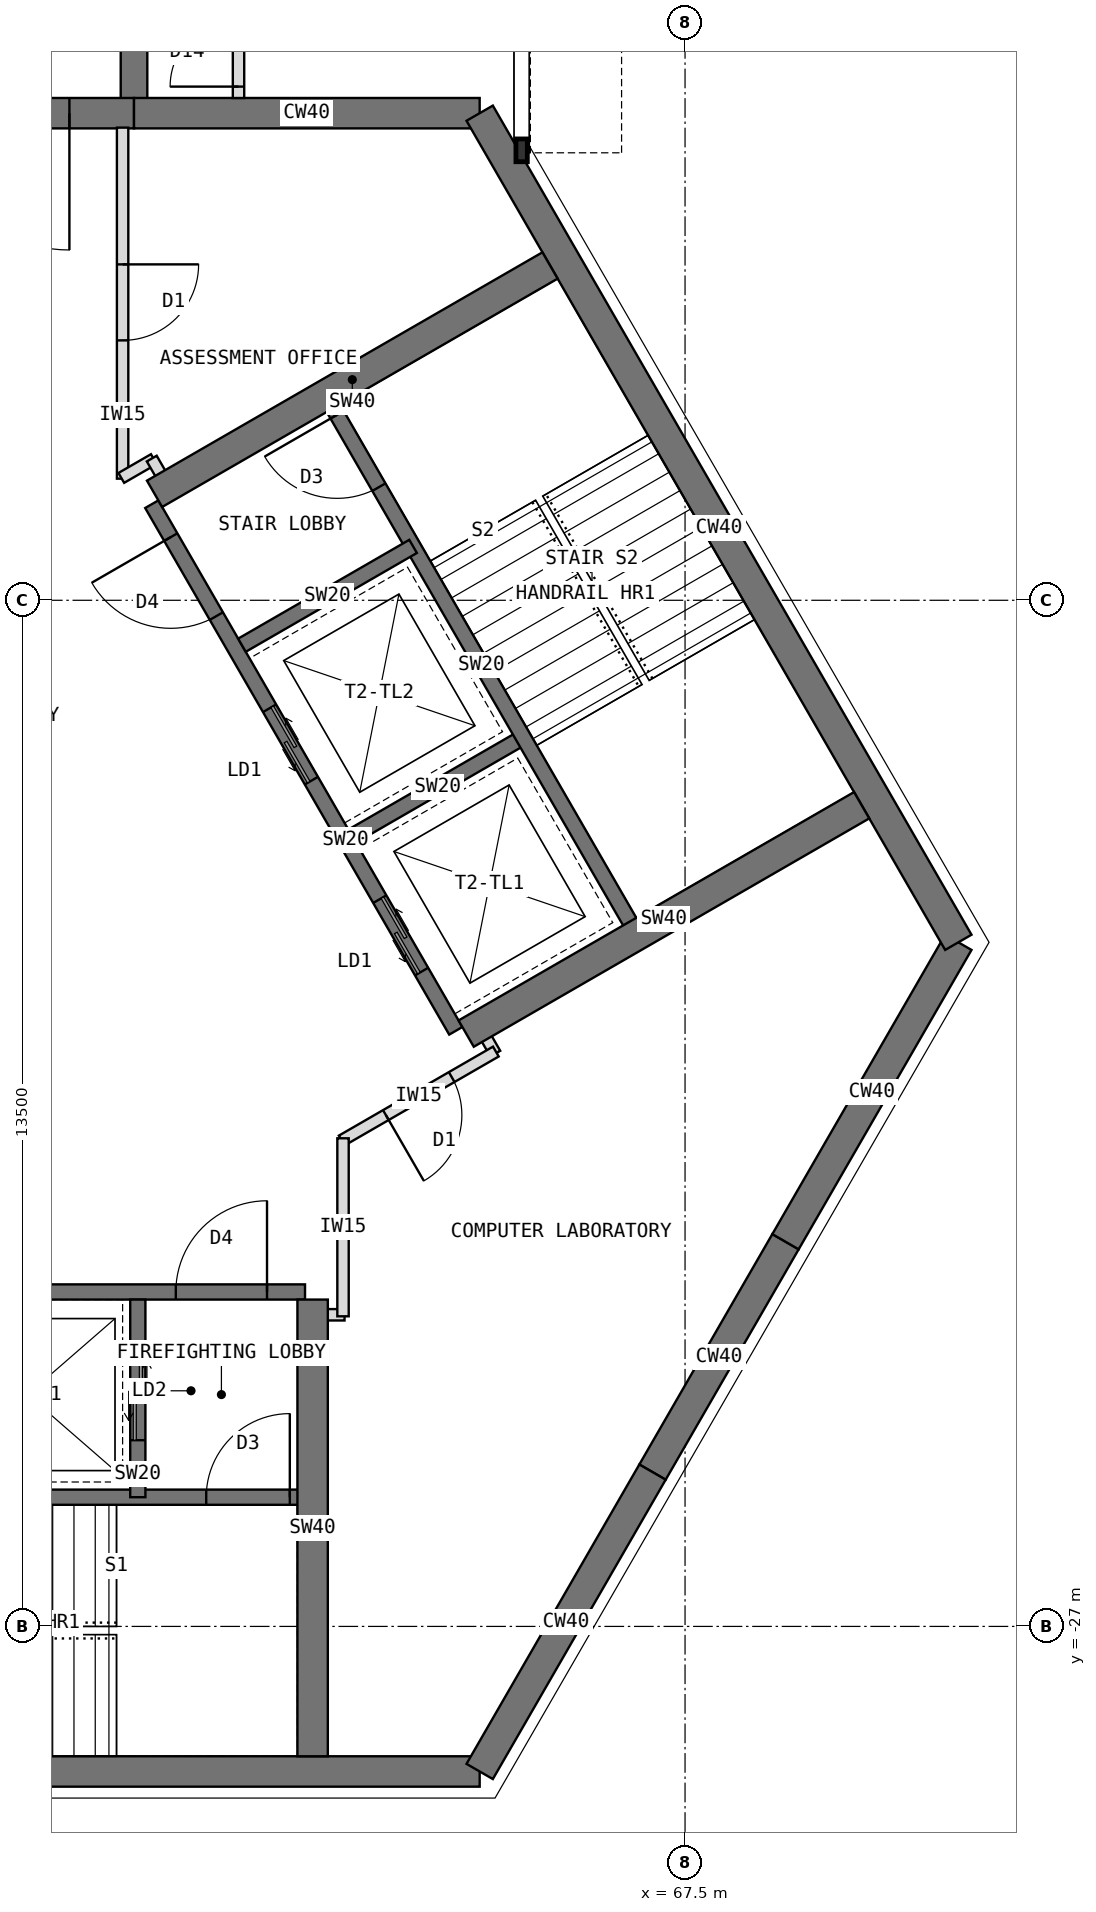
"""IFC4 building model, lengths in metres.
Left out: names, types, materials, properties, quantities, classifications, styles, units other than length and angle.
Written with IfcOpenShell. Run it as: python <this file> out.ifc"""

import sys

from ifc_helpers import new_model, si_unit, direction, frame, frame_2d, origin, place, context, subcontext, project, spatial, rectangle, extrude, element, fill, save


model = new_model("IFC4")
c1 = context("Model", 3, precision=1e-05, world=origin(), true_north=direction((0.0, 1.0)))
c2 = subcontext(c1, "Body", "Model", "MODEL_VIEW")
j1 = project(units=[si_unit("LENGTHUNIT", "METRE"), si_unit("PLANEANGLEUNIT", "RADIAN")], contexts=[c1])
p1 = place(None, origin())
s1 = spatial("IfcSite", under=j1, at=p1, CompositionType="ELEMENT")
p2 = place(p1, origin())
s2 = spatial("IfcBuilding", under=s1, at=p2, CompositionType="ELEMENT")
p3 = place(p2, frame((0.0, 0.0, 251.5)))
s3 = spatial("IfcBuildingStorey", under=s2, at=p3, CompositionType="ELEMENT", Elevation=251.5)
p4 = place(p3, frame((64.798, -7.092, 0.0), z_axis=(0.0, 0.0, 1.0), x_axis=(-1.0, 0.0, 0.0)))
e1 = element("IfcWall", 1, at=p4, inside=s3, PredefinedType="SHEAR", context=c2, shape_type="SweptSolid", body=[
    extrude(rectangle(XDim=4.548, YDim=0.4, at=frame_2d((2.274, 0.0))), origin(), (0.0, 0.0, 1.0), 4.0),
])
p5 = place(p3, frame((60.25, -7.092, 0.0), z_axis=(0.0, 0.0, 1.0), x_axis=(-1.0, 0.0, 0.0)))
e2 = element("IfcWall", 2, at=p5, inside=s3, PredefinedType="SHEAR", context=c2, shape_type="SweptSolid", body=[
    extrude(rectangle(XDim=3.5, YDim=0.4, at=frame_2d((1.75, 0.0))), origin(), (0.0, 0.0, 1.0), 4.0),
])
p6 = place(p5, frame((0.85, 0.0, 0.0)))
e3 = element("IfcOpeningElement", 3, at=p6, cuts=e2, PredefinedType="OPENING", context=c2, shape_type="SweptSolid", body=[
    extrude(rectangle(XDim=1.8, YDim=2.1, at=frame_2d((0.9, 1.05))), frame((0.0, 0.21, 0.0), z_axis=(0.0, -1.0, 0.0), x_axis=(1.0, 0.0, 0.0)), (0.0, 0.0, 1.0), 0.42),
])
p7 = place(p3, frame((52.202, -28.908, 0.0), z_axis=(0.0, 0.0, 1.0), x_axis=(1.0, 0.0, 0.0)))
e4 = element("IfcWall", 4, at=p7, inside=s3, PredefinedType="SHEAR", context=c2, shape_type="SweptSolid", body=[
    extrude(rectangle(XDim=12.596, YDim=0.4, at=frame_2d((6.298, 0.0))), origin(), (0.0, 0.0, 1.0), 4.0),
])
p8 = place(p3, frame((64.798, -28.908, 0.0), z_axis=(0.0, 0.0, 1.0), x_axis=(0.499984222037, 0.866034513004, 0.0)))
e5 = element("IfcWall", 5, at=p8, inside=s3, PredefinedType="SHEAR", context=c2, shape_type="SweptSolid", body=[
    extrude(rectangle(XDim=4.548, YDim=0.4, at=frame_2d((2.274, 0.0))), origin(), (0.0, 0.0, 1.0), 4.0),
])
p9 = place(p3, frame((67.072, -24.97, 0.0), z_axis=(0.0, 0.0, 1.0), x_axis=(0.500010275428, 0.866019471182, 0.0)))
e6 = element("IfcWall", 6, at=p9, inside=s3, PredefinedType="SHEAR", context=c2, shape_type="SweptSolid", body=[
    extrude(rectangle(XDim=3.5, YDim=0.4, at=frame_2d((1.75, 0.0))), origin(), (0.0, 0.0, 1.0), 4.0),
])
p10 = place(p3, frame((68.822, -21.939, 0.0), z_axis=(0.0, 0.0, 1.0), x_axis=(0.500024481964, 0.866011268655, 0.0)))
e7 = element("IfcWall", 7, at=p10, inside=s3, PredefinedType="SHEAR", context=c2, shape_type="SweptSolid", body=[
    extrude(rectangle(XDim=4.548, YDim=0.4, at=frame_2d((2.274, 0.0))), origin(), (0.0, 0.0, 1.0), 4.0),
])
p11 = place(p3, frame((71.096, -18.0, 0.0), z_axis=(0.0, 0.0, 1.0), x_axis=(-0.500005998175, 0.866021940709, 0.0)))
e8 = element("IfcWall", 8, at=p11, inside=s3, PredefinedType="SHEAR", context=c2, shape_type="SweptSolid", body=[
    extrude(rectangle(XDim=12.596, YDim=0.4, at=frame_2d((6.298, 0.0))), origin(), (0.0, 0.0, 1.0), 4.0),
])
p12 = place(p3, frame((60.25, -7.092, 0.0), z_axis=(0.0, 0.0, 1.0), x_axis=(0.0, 1.0, 0.0)))
e9 = element("IfcWall", 9, at=p12, inside=s3, PredefinedType="SHEAR", context=c2, shape_type="SweptSolid", body=[
    extrude(rectangle(XDim=2.592, YDim=0.35, at=frame_2d((1.296, 0.0))), origin(), (0.0, 0.0, 1.0), 4.0),
])
p13 = place(p3, frame((54.5, -22.6, 0.0), z_axis=(0.0, 0.0, 1.0), x_axis=(1.0, 0.0, 0.0)))
e10 = element("IfcWall", 10, at=p13, inside=s3, PredefinedType="SHEAR", context=c2, shape_type="SweptSolid", body=[
    extrude(rectangle(XDim=8.0, YDim=0.2, at=frame_2d((4.0, 0.0))), origin(), (0.0, 0.0, 1.0), 4.0),
])
p14 = place(p13, frame((6.3, 0.0, 0.0)))
e11 = element("IfcOpeningElement", 11, at=p14, cuts=e10, PredefinedType="OPENING", context=c2, shape_type="SweptSolid", body=[
    extrude(rectangle(XDim=1.2, YDim=2.1, at=frame_2d((0.6, 1.05))), frame((0.0, 0.11, 0.0), z_axis=(0.0, -1.0, 0.0), x_axis=(1.0, 0.0, 0.0)), (0.0, 0.0, 1.0), 0.22),
])
p15 = place(p13, frame((0.9, 0.0, 0.0)))
e12 = element("IfcOpeningElement", 12, at=p15, cuts=e10, PredefinedType="OPENING", context=c2, shape_type="SweptSolid", body=[
    extrude(rectangle(XDim=1.1, YDim=2.2, at=frame_2d((0.55, 1.1))), frame((0.0, 0.11, 0.0), z_axis=(0.0, -1.0, 0.0), x_axis=(1.0, 0.0, 0.0)), (0.0, 0.0, 1.0), 0.22),
])
p16 = place(p3, frame((60.3, -22.7, 0.0), z_axis=(0.0, 0.0, 1.0), x_axis=(0.0, -1.0, 0.0)))
e13 = element("IfcWall", 13, at=p16, inside=s3, PredefinedType="SHEAR", context=c2, shape_type="SweptSolid", body=[
    extrude(rectangle(XDim=2.6, YDim=0.2, at=frame_2d((1.3, 0.0))), origin(), (0.0, 0.0, 1.0), 4.0),
])
p17 = place(p16, frame((0.55, 0.0, 0.0)))
e14 = element("IfcOpeningElement", 14, at=p17, cuts=e13, PredefinedType="OPENING", context=c2, shape_type="SweptSolid", body=[
    extrude(rectangle(XDim=1.3, YDim=2.2, at=frame_2d((0.65, 1.1))), frame((0.0, 0.11, 0.0), z_axis=(0.0, -1.0, 0.0), x_axis=(1.0, 0.0, 0.0)), (0.0, 0.0, 1.0), 0.22),
])
p18 = place(p3, frame((54.5, -25.3, 0.0), z_axis=(0.0, 0.0, 1.0), x_axis=(1.0, 0.0, 0.0)))
e15 = element("IfcWall", 15, at=p18, inside=s3, PredefinedType="SHEAR", context=c2, shape_type="SweptSolid", body=[
    extrude(rectangle(XDim=8.0, YDim=0.2, at=frame_2d((4.0, 0.0))), origin(), (0.0, 0.0, 1.0), 4.0),
])
p19 = place(p18, frame((6.7, 0.0, 0.0)))
e16 = element("IfcOpeningElement", 16, at=p19, cuts=e15, PredefinedType="OPENING", context=c2, shape_type="SweptSolid", body=[
    extrude(rectangle(XDim=1.1, YDim=2.1, at=frame_2d((0.55, 1.05))), frame((0.0, 0.11, 0.0), z_axis=(0.0, -1.0, 0.0), x_axis=(1.0, 0.0, 0.0)), (0.0, 0.0, 1.0), 0.22),
])
p20 = place(p3, frame((62.6, -22.7, 0.0), z_axis=(0.0, 0.0, 1.0), x_axis=(0.0, -1.0, 0.0)))
e17 = element("IfcWall", 17, at=p20, inside=s3, PredefinedType="SHEAR", context=c2, shape_type="SweptSolid", body=[
    extrude(rectangle(XDim=6.008, YDim=0.4, at=frame_2d((3.004, 0.0))), origin(), (0.0, 0.0, 1.0), 4.0),
])
p21 = place(p3, frame((64.484, -19.164, 0.0), z_axis=(0.0, 0.0, 1.0), x_axis=(-0.49999894854, 0.866026010844, 0.0)))
e18 = element("IfcWall", 18, at=p21, inside=s3, PredefinedType="SHEAR", context=c2, shape_type="SweptSolid", body=[
    extrude(rectangle(XDim=8.0, YDim=0.2, at=frame_2d((4.0, 0.0))), origin(), (0.0, 0.0, 1.0), 4.0),
])
p22 = place(p21, frame((6.3, 0.0, 0.0)))
e19 = element("IfcOpeningElement", 19, at=p22, cuts=e18, PredefinedType="OPENING", context=c2, shape_type="SweptSolid", body=[
    extrude(rectangle(XDim=1.2, YDim=2.1, at=frame_2d((0.6, 1.05))), frame((0.0, 0.11, 0.0), z_axis=(0.0, -1.0, 0.0), x_axis=(1.0, 0.0, 0.0)), (0.0, 0.0, 1.0), 0.22),
])
p23 = place(p21, frame((0.9, 0.0, 0.0)))
e20 = element("IfcOpeningElement", 20, at=p23, cuts=e18, PredefinedType="OPENING", context=c2, shape_type="SweptSolid", body=[
    extrude(rectangle(XDim=1.1, YDim=2.2, at=frame_2d((0.55, 1.1))), frame((0.0, 0.11, 0.0), z_axis=(0.0, -1.0, 0.0), x_axis=(1.0, 0.0, 0.0)), (0.0, 0.0, 1.0), 0.22),
])
p24 = place(p21, frame((3.8, 0.0, 0.0)))
e21 = element("IfcOpeningElement", 21, at=p24, cuts=e18, PredefinedType="OPENING", context=c2, shape_type="SweptSolid", body=[
    extrude(rectangle(XDim=1.1, YDim=2.2, at=frame_2d((0.55, 1.1))), frame((0.0, 0.11, 0.0), z_axis=(0.0, -1.0, 0.0), x_axis=(1.0, 0.0, 0.0)), (0.0, 0.0, 1.0), 0.22),
])
p25 = place(p3, frame((63.12, -16.603, 0.0), z_axis=(0.0, 0.0, 1.0), x_axis=(0.866062058628, 0.499936506574, 0.0)))
e22 = element("IfcWall", 22, at=p25, inside=s3, PredefinedType="SHEAR", context=c2, shape_type="SweptSolid", body=[
    extrude(rectangle(XDim=2.6, YDim=0.2, at=frame_2d((1.3, 0.0))), origin(), (0.0, 0.0, 1.0), 4.0),
])
p26 = place(p3, frame((61.67, -14.091, 0.0), z_axis=(0.0, 0.0, 1.0), x_axis=(0.86603858612, 0.49997716683, 0.0)))
e23 = element("IfcWall", 23, at=p26, inside=s3, PredefinedType="SHEAR", context=c2, shape_type="SweptSolid", body=[
    extrude(rectangle(XDim=2.6, YDim=0.2, at=frame_2d((1.3, 0.0))), origin(), (0.0, 0.0, 1.0), 4.0),
])
p27 = place(p3, frame((66.822, -17.814, 0.0), z_axis=(0.0, 0.0, 1.0), x_axis=(-0.49999894854, 0.866026010844, 0.0)))
e24 = element("IfcWall", 24, at=p27, inside=s3, PredefinedType="SHEAR", context=c2, shape_type="SweptSolid", body=[
    extrude(rectangle(XDim=8.0, YDim=0.2, at=frame_2d((4.0, 0.0))), origin(), (0.0, 0.0, 1.0), 4.0),
])
p28 = place(p27, frame((6.7, 0.0, 0.0)))
e25 = element("IfcOpeningElement", 25, at=p28, cuts=e24, PredefinedType="OPENING", context=c2, shape_type="SweptSolid", body=[
    extrude(rectangle(XDim=1.1, YDim=2.1, at=frame_2d((0.55, 1.05))), frame((0.0, 0.11, 0.0), z_axis=(0.0, -1.0, 0.0), x_axis=(1.0, 0.0, 0.0)), (0.0, 0.0, 1.0), 0.22),
])
for number, where, z_axis, x_axis in (
    (26, (60.52, -12.099, 0.0), (0.0, 0.0, 1.0), (0.866, 0.5, 0.0)),
    (27, (64.62, -19.201, 0.0), (0.0, 0.0, 1.0), (0.866, 0.5, 0.0)),
):
    element("IfcWall", number, at=place(p3, frame(where, z_axis=z_axis, x_axis=x_axis)), inside=s3, PredefinedType="SHEAR", context=c2, shape_type="SweptSolid", body=[
        extrude(rectangle(XDim=6.008, YDim=0.4, at=frame_2d((3.004, 0.0))), origin(), (0.0, 0.0, 1.0), 4.0),
    ])
p29 = place(p3, frame((61.625, -6.892, 0.0), z_axis=(0.0, 0.0, 1.0), x_axis=(0.0, 1.0, 0.0)))
e28 = element("IfcWall", 28, at=p29, inside=s3, PredefinedType="PARTITIONING", context=c2, shape_type="SweptSolid", body=[
    extrude(rectangle(XDim=2.4, YDim=0.15, at=frame_2d((1.2, 0.0))), origin(), (0.0, 0.0, 1.0), 3.8),
])
p30 = place(p29, frame((0.15, 0.0, 0.0)))
e29 = element("IfcOpeningElement", 29, at=p30, cuts=e28, PredefinedType="OPENING", context=c2, shape_type="SweptSolid", body=[
    extrude(rectangle(XDim=0.9, YDim=2.1, at=frame_2d((0.45, 1.05))), frame((0.0, 0.085, 0.0), z_axis=(0.0, -1.0, 0.0), x_axis=(1.0, 0.0, 0.0)), (0.0, 0.0, 1.0), 0.17),
])
p31 = place(p3, frame((63.02, -22.9, 0.0), z_axis=(0.0, 0.0, 1.0), x_axis=(-1.0, 0.0, 0.0)))
e30 = element("IfcWall", 30, at=p31, inside=s3, PredefinedType="PARTITIONING", context=c2, shape_type="SweptSolid", body=[
    extrude(rectangle(XDim=0.43, YDim=0.15, at=frame_2d((0.215, 0.0))), origin(), (0.0, 0.0, 1.0), 3.8),
])
p32 = place(p3, frame((60.1, -7.282, 0.0), z_axis=(0.0, 0.0, 1.0), x_axis=(0.0, -1.0, 0.0)))
e31 = element("IfcWall", 31, at=p32, inside=s3, PredefinedType="PARTITIONING", context=c2, shape_type="SweptSolid", body=[
    extrude(rectangle(XDim=4.618, YDim=0.15, at=frame_2d((2.309, 0.0))), origin(), (0.0, 0.0, 1.0), 3.8),
])
p33 = place(p32, frame((1.799, 0.0, 0.0)))
e32 = element("IfcOpeningElement", 32, at=p33, cuts=e31, PredefinedType="OPENING", context=c2, shape_type="SweptSolid", body=[
    extrude(rectangle(XDim=1.0, YDim=2.1, at=frame_2d((0.5, 1.05))), frame((0.0, 0.085, 0.0), z_axis=(0.0, -1.0, 0.0), x_axis=(1.0, 0.0, 0.0)), (0.0, 0.0, 1.0), 0.17),
])
p34 = place(p3, frame((60.083, -11.89, 0.0), z_axis=(0.0, 0.0, 1.0), x_axis=(0.865831790172, 0.50033519877, 0.0)))
e33 = element("IfcWall", 33, at=p34, inside=s3, PredefinedType="PARTITIONING", context=c2, shape_type="SweptSolid", body=[
    extrude(rectangle(XDim=0.494, YDim=0.15, at=frame_2d((0.247, 0.0))), origin(), (0.0, 0.0, 1.0), 3.8),
])
for number, where, z_axis, x_axis in (
    (34, (60.483, -11.635, 0.0), (0.0, 0.0, 1.0), (0.5, -0.866, 0.0)),
    (35, (64.789, -19.092, 0.0), (0.0, 0.0, 1.0), (0.5, -0.866, 0.0)),
):
    element("IfcWall", number, at=place(p3, frame(where, z_axis=z_axis, x_axis=x_axis)), inside=s3, PredefinedType="PARTITIONING", context=c2, shape_type="SweptSolid", body=[
        extrude(rectangle(XDim=0.43, YDim=0.15, at=frame_2d((0.215, 0.0))), origin(), (0.0, 0.0, 1.0), 3.8),
    ])
p35 = place(p3, frame((65.011, -19.437, 0.0), z_axis=(0.0, 0.0, 1.0), x_axis=(-0.865982457891, -0.500074377092, 0.0)))
e36 = element("IfcWall", 36, at=p35, inside=s3, PredefinedType="PARTITIONING", context=c2, shape_type="SweptSolid", body=[
    extrude(rectangle(XDim=2.342, YDim=0.15, at=frame_2d((1.171, 0.0))), origin(), (0.0, 0.0, 1.0), 3.8),
])
p36 = place(p35, frame((0.671, 0.0, 0.0)))
e37 = element("IfcOpeningElement", 37, at=p36, cuts=e36, PredefinedType="OPENING", context=c2, shape_type="SweptSolid", body=[
    extrude(rectangle(XDim=1.0, YDim=2.1, at=frame_2d((0.5, 1.05))), frame((0.0, 0.085, 0.0), z_axis=(0.0, -1.0, 0.0), x_axis=(1.0, 0.0, 0.0)), (0.0, 0.0, 1.0), 0.17),
])
p37 = place(p3, frame((63.0, -20.578, 0.0), z_axis=(0.0, 0.0, 1.0), x_axis=(0.0, -1.0, 0.0)))
e38 = element("IfcWall", 38, at=p37, inside=s3, PredefinedType="PARTITIONING", context=c2, shape_type="SweptSolid", body=[
    extrude(rectangle(XDim=2.342, YDim=0.15, at=frame_2d((1.171, 0.0))), origin(), (0.0, 0.0, 1.0), 3.8),
])
p38 = place(p14, origin())
e39 = element("IfcDoor", 39, at=p38, inside=s3, OperationType="SINGLE_SWING_RIGHT", PredefinedType="DOOR", context=c2, shape_type="SweptSolid", body=[
    extrude(rectangle(XDim=1.2, YDim=2.1, at=frame_2d((0.6, 1.05))), frame((0.0, 0.025, 0.0), z_axis=(0.0, -1.0, 0.0), x_axis=(1.0, 0.0, 0.0)), (0.0, 0.0, 1.0), 0.05),
])
fill(e11, e39)
p39 = place(p17, origin())
e40 = element("IfcDoor", 40, at=p39, inside=s3, OperationType="DOUBLE_DOOR_SLIDING", PredefinedType="DOOR", context=c2, shape_type="SweptSolid", body=[
    extrude(rectangle(XDim=1.3, YDim=2.2, at=frame_2d((0.65, 1.1))), frame((0.0, 0.025, 0.0), z_axis=(0.0, -1.0, 0.0), x_axis=(1.0, 0.0, 0.0)), (0.0, 0.0, 1.0), 0.05),
])
fill(e14, e40)
p40 = place(p19, origin())
e41 = element("IfcDoor", 41, at=p40, inside=s3, OperationType="SINGLE_SWING_RIGHT", PredefinedType="DOOR", context=c2, shape_type="SweptSolid", body=[
    extrude(rectangle(XDim=1.1, YDim=2.1, at=frame_2d((0.55, 1.05))), frame((0.0, 0.025, 0.0), z_axis=(0.0, -1.0, 0.0), x_axis=(1.0, 0.0, 0.0)), (0.0, 0.0, 1.0), 0.05),
])
fill(e16, e41)
p41 = place(p22, origin())
e42 = element("IfcDoor", 42, at=p41, inside=s3, OperationType="SINGLE_SWING_RIGHT", PredefinedType="DOOR", context=c2, shape_type="SweptSolid", body=[
    extrude(rectangle(XDim=1.2, YDim=2.1, at=frame_2d((0.6, 1.05))), frame((0.0, 0.025, 0.0), z_axis=(0.0, -1.0, 0.0), x_axis=(1.0, 0.0, 0.0)), (0.0, 0.0, 1.0), 0.05),
])
fill(e19, e42)
p42 = place(p23, origin())
e43 = element("IfcDoor", 43, at=p42, inside=s3, OperationType="DOUBLE_DOOR_SLIDING", PredefinedType="DOOR", context=c2, shape_type="SweptSolid", body=[
    extrude(rectangle(XDim=1.1, YDim=2.2, at=frame_2d((0.55, 1.1))), frame((0.0, 0.025, 0.0), z_axis=(0.0, -1.0, 0.0), x_axis=(1.0, 0.0, 0.0)), (0.0, 0.0, 1.0), 0.05),
])
fill(e20, e43)
p43 = place(p24, origin())
e44 = element("IfcDoor", 44, at=p43, inside=s3, OperationType="DOUBLE_DOOR_SLIDING", PredefinedType="DOOR", context=c2, shape_type="SweptSolid", body=[
    extrude(rectangle(XDim=1.1, YDim=2.2, at=frame_2d((0.55, 1.1))), frame((0.0, 0.025, 0.0), z_axis=(0.0, -1.0, 0.0), x_axis=(1.0, 0.0, 0.0)), (0.0, 0.0, 1.0), 0.05),
])
fill(e21, e44)
p44 = place(p28, origin())
e45 = element("IfcDoor", 45, at=p44, inside=s3, OperationType="SINGLE_SWING_RIGHT", PredefinedType="DOOR", context=c2, shape_type="SweptSolid", body=[
    extrude(rectangle(XDim=1.1, YDim=2.1, at=frame_2d((0.55, 1.05))), frame((0.0, 0.025, 0.0), z_axis=(0.0, -1.0, 0.0), x_axis=(1.0, 0.0, 0.0)), (0.0, 0.0, 1.0), 0.05),
])
fill(e25, e45)
p45 = place(p6, origin())
e46 = element("IfcDoor", 46, at=p45, inside=s3, OperationType="DOUBLE_DOOR_DOUBLE_SWING", PredefinedType="DOOR", context=c2, shape_type="SweptSolid", body=[
    extrude(rectangle(XDim=1.8, YDim=2.1, at=frame_2d((0.9, 1.05))), frame((0.0, 0.025, 0.0), z_axis=(0.0, -1.0, 0.0), x_axis=(1.0, 0.0, 0.0)), (0.0, 0.0, 1.0), 0.05),
])
fill(e3, e46)
p46 = place(p30, origin())
e47 = element("IfcDoor", 47, at=p46, inside=s3, OperationType="SINGLE_SWING_LEFT", PredefinedType="DOOR", context=c2, shape_type="SweptSolid", body=[
    extrude(rectangle(XDim=0.9, YDim=2.1, at=frame_2d((0.45, 1.05))), frame((0.0, 0.025, 0.0), z_axis=(0.0, -1.0, 0.0), x_axis=(1.0, 0.0, 0.0)), (0.0, 0.0, 1.0), 0.05),
])
fill(e29, e47)
p47 = place(p36, origin())
e48 = element("IfcDoor", 48, at=p47, inside=s3, OperationType="SINGLE_SWING_RIGHT", PredefinedType="DOOR", context=c2, shape_type="SweptSolid", body=[
    extrude(rectangle(XDim=1.0, YDim=2.1, at=frame_2d((0.5, 1.05))), frame((0.0, 0.025, 0.0), z_axis=(0.0, -1.0, 0.0), x_axis=(1.0, 0.0, 0.0)), (0.0, 0.0, 1.0), 0.05),
])
fill(e37, e48)
p48 = place(p33, origin())
e49 = element("IfcDoor", 49, at=p48, inside=s3, OperationType="SINGLE_SWING_LEFT", PredefinedType="DOOR", context=c2, shape_type="SweptSolid", body=[
    extrude(rectangle(XDim=1.0, YDim=2.1, at=frame_2d((0.5, 1.05))), frame((0.0, 0.025, 0.0), z_axis=(0.0, -1.0, 0.0), x_axis=(1.0, 0.0, 0.0)), (0.0, 0.0, 1.0), 0.05),
])
fill(e32, e49)
save(model, sys.argv[1])
